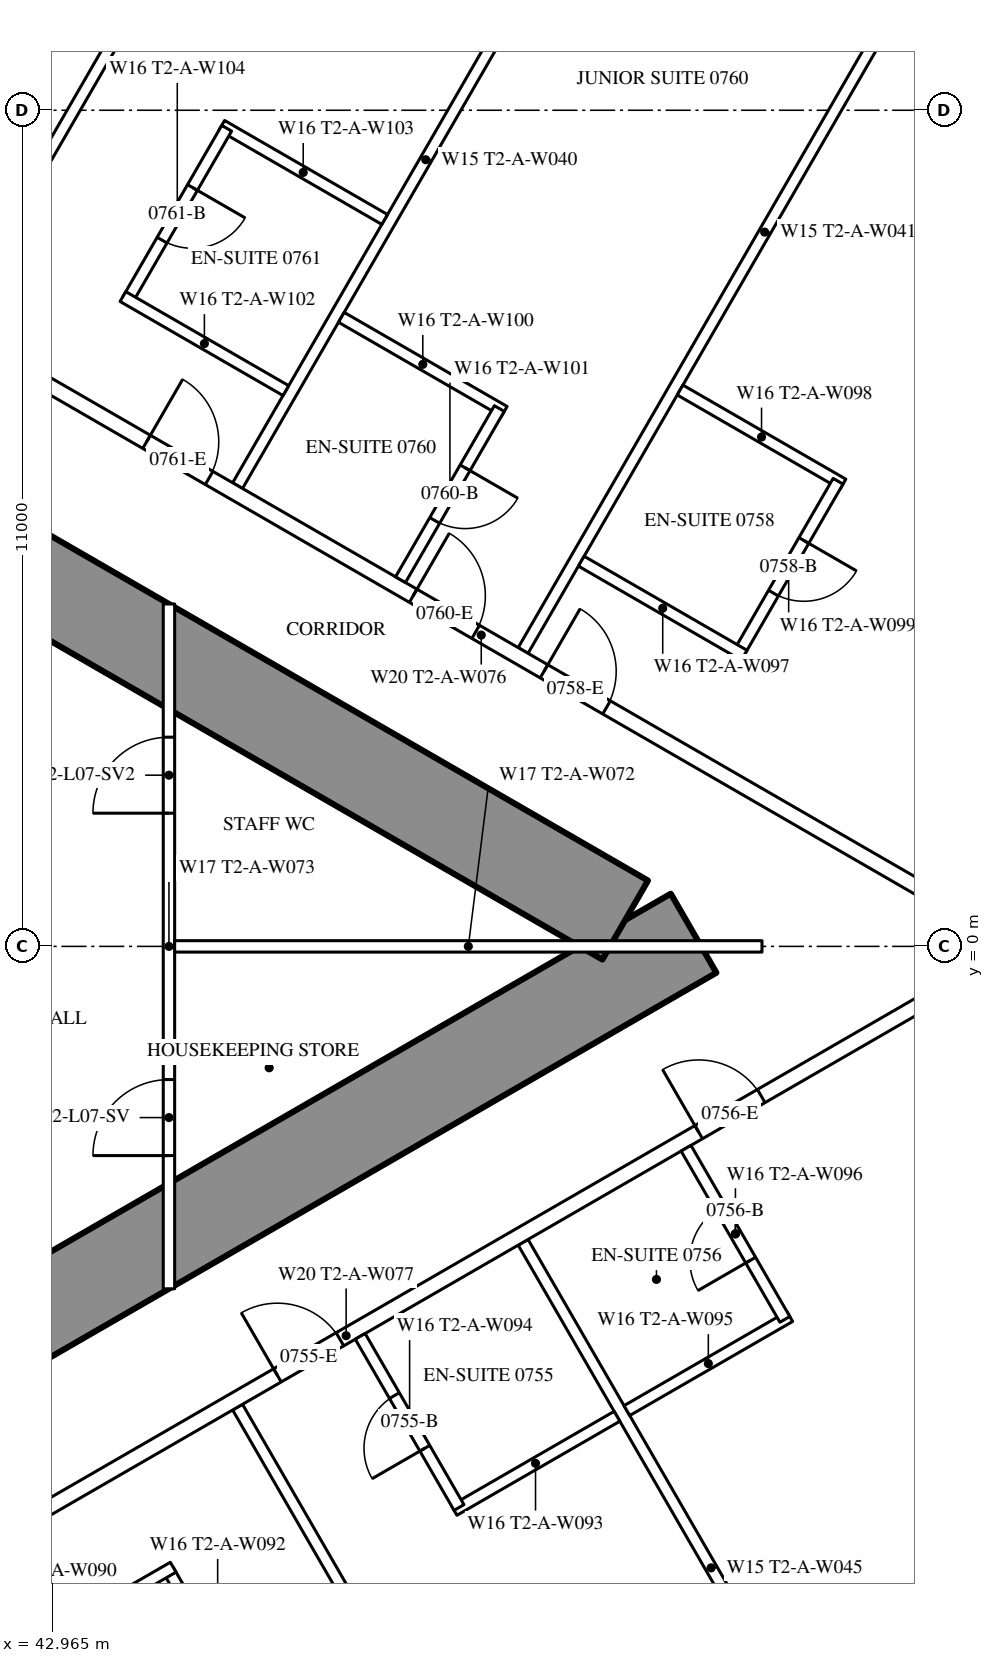
"""IFC4 building model, lengths in metres.
Left out: names, types, materials, properties, quantities, classifications, styles, units other than length and angle.
Written with IfcOpenShell. Run it as: python <this file> out.ifc"""

import sys

from ifc_helpers import new_model, si_unit, direction, frame, frame_2d, origin, place, context, subcontext, project, spatial, rectangle, extrude, element, fill, save


model = new_model("IFC4")
c1 = context("Model", 3, precision=1e-05, world=origin(), true_north=direction((0.0, 1.0)))
c2 = subcontext(c1, "Body", "Model", "MODEL_VIEW")
j1 = project(units=[si_unit("LENGTHUNIT", "METRE"), si_unit("PLANEANGLEUNIT", "RADIAN")], contexts=[c1])
p1 = place(None, origin())
s1 = spatial("IfcSite", under=j1, at=p1, CompositionType="ELEMENT")
p2 = place(p1, origin())
s2 = spatial("IfcBuilding", under=s1, at=p2, CompositionType="ELEMENT")
p3 = place(p2, frame((0.0, 0.0, 32.0)))
s3 = spatial("IfcBuildingStorey", under=s2, at=p3, CompositionType="ELEMENT", Elevation=32.0)
p4 = place(p3, frame((27.2, -13.8, 0.0), z_axis=(0.0, 0.0, 1.0), x_axis=(0.866027159892, 0.499996958321, 0.0)))
e1 = element("IfcWall", 1, at=p4, inside=s3, PredefinedType="SHEAR", context=c2, shape_type="SweptSolid", body=[
    extrude(rectangle(XDim=27.947, YDim=1.2, at=frame_2d((13.973, 0.0))), origin(), (0.0, 0.0, 1.0), 3.5),
])
p5 = place(p4, frame((4.6, 0.0, 0.0)))
e2 = element("IfcOpeningElement", 2, at=p5, cuts=e1, PredefinedType="OPENING", context=c2, shape_type="SweptSolid", body=[
    extrude(rectangle(XDim=1.0, YDim=2.2, at=frame_2d((0.5, 1.1))), frame((0.0, 0.61, 0.0), z_axis=(0.0, -1.0, 0.0), x_axis=(1.0, 0.0, 0.0)), (0.0, 0.0, 1.0), 1.22),
])
p6 = place(p4, frame((13.395, 0.0, 0.0)))
e3 = element("IfcOpeningElement", 3, at=p6, cuts=e1, PredefinedType="OPENING", context=c2, shape_type="SweptSolid", body=[
    extrude(rectangle(XDim=1.8, YDim=2.2, at=frame_2d((0.9, 1.1))), frame((0.0, 0.61, 0.0), z_axis=(0.0, -1.0, 0.0), x_axis=(1.0, 0.0, 0.0)), (0.0, 0.0, 1.0), 1.22),
])
p7 = place(p3, frame((27.2, 13.8, 0.0), z_axis=(0.0, 0.0, 1.0), x_axis=(0.866024515034, -0.500001539357, 0.0)))
e4 = element("IfcWall", 4, at=p7, inside=s3, PredefinedType="SHEAR", context=c2, shape_type="SweptSolid", body=[
    extrude(rectangle(XDim=26.907, YDim=1.2, at=frame_2d((13.454, 0.0))), origin(), (0.0, 0.0, 1.0), 3.5),
])
p8 = place(p7, frame((4.6, 0.0, 0.0)))
e5 = element("IfcOpeningElement", 5, at=p8, cuts=e4, PredefinedType="OPENING", context=c2, shape_type="SweptSolid", body=[
    extrude(rectangle(XDim=1.0, YDim=2.2, at=frame_2d((0.5, 1.1))), frame((0.0, 0.61, 0.0), z_axis=(0.0, -1.0, 0.0), x_axis=(1.0, 0.0, 0.0)), (0.0, 0.0, 1.0), 1.22),
])
p9 = place(p7, frame((13.395, 0.0, 0.0)))
e6 = element("IfcOpeningElement", 6, at=p9, cuts=e4, PredefinedType="OPENING", context=c2, shape_type="SweptSolid", body=[
    extrude(rectangle(XDim=1.8, YDim=2.2, at=frame_2d((0.9, 1.1))), frame((0.0, 0.61, 0.0), z_axis=(0.0, -1.0, 0.0), x_axis=(1.0, 0.0, 0.0)), (0.0, 0.0, 1.0), 1.22),
])
p10 = place(p3, frame((41.647, -8.23, 0.0), z_axis=(0.0, 0.0, 1.0), x_axis=(0.49998590462, -0.866033541603, 0.0)))
e7 = element("IfcWall", 7, at=p10, inside=s3, PredefinedType="PARTITIONING", context=c2, shape_type="SweptSolid", body=[
    extrude(rectangle(XDim=12.621, YDim=0.15, at=frame_2d((6.311, 0.0))), origin(), (0.0, 0.0, 1.0), 3.25),
])
p11 = place(p3, frame((45.403, -6.062, 0.0), z_axis=(0.0, 0.0, 1.0), x_axis=(0.500007077968, -0.866021317279, 0.0)))
e8 = element("IfcWall", 8, at=p11, inside=s3, PredefinedType="PARTITIONING", context=c2, shape_type="SweptSolid", body=[
    extrude(rectangle(XDim=12.721, YDim=0.15, at=frame_2d((6.361, 0.0))), origin(), (0.0, 0.0, 1.0), 3.25),
])
p12 = place(p3, frame((49.159, -3.893, 0.0), z_axis=(0.0, 0.0, 1.0), x_axis=(0.499998773722, -0.866026111775, 0.0)))
e9 = element("IfcWall", 9, at=p12, inside=s3, PredefinedType="PARTITIONING", context=c2, shape_type="SweptSolid", body=[
    extrude(rectangle(XDim=9.892, YDim=0.15, at=frame_2d((4.946, 0.0))), origin(), (0.0, 0.0, 1.0), 2.25),
])
p13 = place(p3, frame((41.647, 8.23, 0.0), z_axis=(0.0, 0.0, 1.0), x_axis=(0.49998590462, 0.866033541603, 0.0)))
e10 = element("IfcWall", 10, at=p13, inside=s3, PredefinedType="PARTITIONING", context=c2, shape_type="SweptSolid", body=[
    extrude(rectangle(XDim=12.621, YDim=0.15, at=frame_2d((6.311, 0.0))), origin(), (0.0, 0.0, 1.0), 3.25),
])
p14 = place(p3, frame((45.403, 6.062, 0.0), z_axis=(0.0, 0.0, 1.0), x_axis=(0.500013434677, 0.866017647131, 0.0)))
e11 = element("IfcWall", 11, at=p14, inside=s3, PredefinedType="PARTITIONING", context=c2, shape_type="SweptSolid", body=[
    extrude(rectangle(XDim=9.902, YDim=0.15, at=frame_2d((4.951, 0.0))), origin(), (0.0, 0.0, 1.0), 2.25),
])
p15 = place(p3, frame((49.159, 3.893, 0.0), z_axis=(0.0, 0.0, 1.0), x_axis=(0.499995664361, 0.866027906952, 0.0)))
e12 = element("IfcWall", 12, at=p15, inside=s3, PredefinedType="PARTITIONING", context=c2, shape_type="SweptSolid", body=[
    extrude(rectangle(XDim=12.711, YDim=0.15, at=frame_2d((6.356, 0.0))), origin(), (0.0, 0.0, 1.0), 3.25),
])
p16 = place(p3, frame((37.96, -10.243, 0.0), z_axis=(0.0, 0.0, 1.0), x_axis=(0.866026429433, 0.499998223521, 0.0)))
e13 = element("IfcWall", 13, at=p16, inside=s3, PredefinedType="PARTITIONING", context=c2, shape_type="SweptSolid", body=[
    extrude(rectangle(XDim=20.487, YDim=0.2, at=frame_2d((10.243, 0.0))), origin(), (0.0, 0.0, 1.0), 3.25),
])
p17 = place(p16, frame((4.575, 0.0, 0.0)))
e14 = element("IfcOpeningElement", 14, at=p17, cuts=e13, PredefinedType="OPENING", context=c2, shape_type="SweptSolid", body=[
    extrude(rectangle(XDim=0.95, YDim=2.2, at=frame_2d((0.475, 1.1))), frame((0.0, 0.11, 0.0), z_axis=(0.0, -1.0, 0.0), x_axis=(1.0, 0.0, 0.0)), (0.0, 0.0, 1.0), 0.22),
])
p18 = place(p16, frame((9.199, 0.0, 0.0)))
e15 = element("IfcOpeningElement", 15, at=p18, cuts=e13, PredefinedType="OPENING", context=c2, shape_type="SweptSolid", body=[
    extrude(rectangle(XDim=0.95, YDim=2.2, at=frame_2d((0.475, 1.1))), frame((0.0, 0.11, 0.0), z_axis=(0.0, -1.0, 0.0), x_axis=(1.0, 0.0, 0.0)), (0.0, 0.0, 1.0), 0.22),
])
p19 = place(p16, frame((15.599, 0.0, 0.0)))
e16 = element("IfcOpeningElement", 16, at=p19, cuts=e13, PredefinedType="OPENING", context=c2, shape_type="SweptSolid", body=[
    extrude(rectangle(XDim=0.95, YDim=2.2, at=frame_2d((0.475, 1.1))), frame((0.0, 0.11, 0.0), z_axis=(0.0, -1.0, 0.0), x_axis=(1.0, 0.0, 0.0)), (0.0, 0.0, 1.0), 0.22),
])
p20 = place(p16, frame((2.875, 0.0, 0.0)))
e17 = element("IfcOpeningElement", 17, at=p20, cuts=e13, PredefinedType="OPENING", context=c2, shape_type="SweptSolid", body=[
    extrude(rectangle(XDim=0.95, YDim=2.2, at=frame_2d((0.475, 1.1))), frame((0.0, 0.11, 0.0), z_axis=(0.0, -1.0, 0.0), x_axis=(1.0, 0.0, 0.0)), (0.0, 0.0, 1.0), 0.22),
])
p21 = place(p3, frame((41.619, 8.131, 0.0), z_axis=(0.0, 0.0, 1.0), x_axis=(0.86603245327, -0.499987789734, 0.0)))
e18 = element("IfcWall", 18, at=p21, inside=s3, PredefinedType="PARTITIONING", context=c2, shape_type="SweptSolid", body=[
    extrude(rectangle(XDim=16.142, YDim=0.2, at=frame_2d((8.071, 0.0))), origin(), (0.0, 0.0, 1.0), 3.25),
])
p22 = place(p21, frame((9.024, 0.0, 0.0)))
e19 = element("IfcOpeningElement", 19, at=p22, cuts=e18, PredefinedType="OPENING", context=c2, shape_type="SweptSolid", body=[
    extrude(rectangle(XDim=0.95, YDim=2.2, at=frame_2d((0.475, 1.1))), frame((0.0, 0.11, 0.0), z_axis=(0.0, -1.0, 0.0), x_axis=(1.0, 0.0, 0.0)), (0.0, 0.0, 1.0), 0.22),
])
p23 = place(p21, frame((7.037, 0.0, 0.0)))
e20 = element("IfcOpeningElement", 20, at=p23, cuts=e18, PredefinedType="OPENING", context=c2, shape_type="SweptSolid", body=[
    extrude(rectangle(XDim=0.95, YDim=2.2, at=frame_2d((0.475, 1.1))), frame((0.0, 0.11, 0.0), z_axis=(0.0, -1.0, 0.0), x_axis=(1.0, 0.0, 0.0)), (0.0, 0.0, 1.0), 0.22),
])
p24 = place(p21, frame((2.987, 0.0, 0.0)))
e21 = element("IfcOpeningElement", 21, at=p24, cuts=e18, PredefinedType="OPENING", context=c2, shape_type="SweptSolid", body=[
    extrude(rectangle(XDim=0.95, YDim=2.2, at=frame_2d((0.475, 1.1))), frame((0.0, 0.11, 0.0), z_axis=(0.0, -1.0, 0.0), x_axis=(1.0, 0.0, 0.0)), (0.0, 0.0, 1.0), 0.22),
])
p25 = place(p3, frame((44.491, -8.205, 0.0), z_axis=(0.0, 0.0, 1.0), x_axis=(0.500047596559, -0.865997922154, 0.0)))
e22 = element("IfcWall", 22, at=p25, inside=s3, PredefinedType="PARTITIONING", context=c2, shape_type="SweptSolid", body=[
    extrude(rectangle(XDim=2.6, YDim=0.15, at=frame_2d((1.3, 0.0))), origin(), (0.0, 0.0, 1.0), 3.25),
])
p26 = place(p25, frame((0.9, 0.0, 0.0)))
e23 = element("IfcOpeningElement", 23, at=p26, cuts=e22, PredefinedType="OPENING", context=c2, shape_type="SweptSolid", body=[
    extrude(rectangle(XDim=0.8, YDim=2.2, at=frame_2d((0.4, 1.1))), frame((0.0, 0.085, 0.0), z_axis=(0.0, -1.0, 0.0), x_axis=(1.0, 0.0, 0.0)), (0.0, 0.0, 1.0), 0.17),
])
for number, where, z_axis, x_axis in (
    (24, (42.412, -9.405, 0.0), (0.0, 0.0, 1.0), (0.866, 0.5, 0.0)),
    (25, (48.251, -7.42, 0.0), (0.0, 0.0, 1.0), (0.866, 0.5, 0.0)),
):
    element("IfcWall", number, at=place(p3, frame(where, z_axis=z_axis, x_axis=x_axis)), inside=s3, PredefinedType="PARTITIONING", context=c2, shape_type="SweptSolid", body=[
        extrude(rectangle(XDim=2.475, YDim=0.15, at=frame_2d((1.237, 0.0))), origin(), (0.0, 0.0, 1.0), 3.25),
    ])
p27 = place(p3, frame((47.016, -5.13, 0.0), z_axis=(0.0, 0.0, 1.0), x_axis=(0.500006934395, -0.866021400173, 0.0)))
e26 = element("IfcWall", 26, at=p27, inside=s3, PredefinedType="PARTITIONING", context=c2, shape_type="SweptSolid", body=[
    extrude(rectangle(XDim=2.6, YDim=0.15, at=frame_2d((1.3, 0.0))), origin(), (0.0, 0.0, 1.0), 3.25),
])
p28 = place(p27, frame((0.9, 0.0, 0.0)))
e27 = element("IfcOpeningElement", 27, at=p28, cuts=e26, PredefinedType="OPENING", context=c2, shape_type="SweptSolid", body=[
    extrude(rectangle(XDim=0.8, YDim=2.2, at=frame_2d((0.4, 1.1))), frame((0.0, 0.085, 0.0), z_axis=(0.0, -1.0, 0.0), x_axis=(1.0, 0.0, 0.0)), (0.0, 0.0, 1.0), 0.17),
])
p29 = place(p3, frame((50.524, -6.107, 0.0), z_axis=(0.0, 0.0, 1.0), x_axis=(0.866031185235, 0.4999899861, 0.0)))
e28 = element("IfcWall", 28, at=p29, inside=s3, PredefinedType="PARTITIONING", context=c2, shape_type="SweptSolid", body=[
    extrude(rectangle(XDim=2.475, YDim=0.15, at=frame_2d((1.238, 0.0))), origin(), (0.0, 0.0, 1.0), 3.25),
])
p30 = place(p3, frame((51.303, -2.656, 0.0), z_axis=(0.0, 0.0, 1.0), x_axis=(0.500047596559, -0.865997922154, 0.0)))
e29 = element("IfcWall", 29, at=p30, inside=s3, PredefinedType="PARTITIONING", context=c2, shape_type="SweptSolid", body=[
    extrude(rectangle(XDim=2.6, YDim=0.15, at=frame_2d((1.3, 0.0))), origin(), (0.0, 0.0, 1.0), 3.25),
])
p31 = place(p30, frame((0.9, 0.0, 0.0)))
e30 = element("IfcOpeningElement", 30, at=p31, cuts=e29, PredefinedType="OPENING", context=c2, shape_type="SweptSolid", body=[
    extrude(rectangle(XDim=0.8, YDim=2.2, at=frame_2d((0.4, 1.1))), frame((0.0, 0.085, 0.0), z_axis=(0.0, -1.0, 0.0), x_axis=(1.0, 0.0, 0.0)), (0.0, 0.0, 1.0), 0.17),
])
p32 = place(p3, frame((51.224, 7.32, 0.0), z_axis=(0.0, 0.0, 1.0), x_axis=(0.866031185235, -0.4999899861, 0.0)))
e31 = element("IfcWall", 31, at=p32, inside=s3, PredefinedType="PARTITIONING", context=c2, shape_type="SweptSolid", body=[
    extrude(rectangle(XDim=2.475, YDim=0.15, at=frame_2d((1.238, 0.0))), origin(), (0.0, 0.0, 1.0), 3.25),
])
p33 = place(p3, frame((52.003, 3.868, 0.0), z_axis=(0.0, 0.0, 1.0), x_axis=(0.500047596559, 0.865997922154, 0.0)))
e32 = element("IfcWall", 32, at=p33, inside=s3, PredefinedType="PARTITIONING", context=c2, shape_type="SweptSolid", body=[
    extrude(rectangle(XDim=2.6, YDim=0.15, at=frame_2d((1.3, 0.0))), origin(), (0.0, 0.0, 1.0), 3.25),
])
p34 = place(p33, frame((0.9, 0.0, 0.0)))
e33 = element("IfcOpeningElement", 33, at=p34, cuts=e32, PredefinedType="OPENING", context=c2, shape_type="SweptSolid", body=[
    extrude(rectangle(XDim=0.8, YDim=2.2, at=frame_2d((0.4, 1.1))), frame((0.0, 0.085, 0.0), z_axis=(0.0, -1.0, 0.0), x_axis=(1.0, 0.0, 0.0)), (0.0, 0.0, 1.0), 0.17),
])
p35 = place(p3, frame((49.925, 5.068, 0.0), z_axis=(0.0, 0.0, 1.0), x_axis=(0.866006523861, -0.500032699561, 0.0)))
e34 = element("IfcWall", 34, at=p35, inside=s3, PredefinedType="PARTITIONING", context=c2, shape_type="SweptSolid", body=[
    extrude(rectangle(XDim=2.475, YDim=0.15, at=frame_2d((1.237, 0.0))), origin(), (0.0, 0.0, 1.0), 3.25),
])
p36 = place(p3, frame((46.768, 8.276, 0.0), z_axis=(0.0, 0.0, 1.0), x_axis=(0.866031185235, -0.4999899861, 0.0)))
e35 = element("IfcWall", 35, at=p36, inside=s3, PredefinedType="PARTITIONING", context=c2, shape_type="SweptSolid", body=[
    extrude(rectangle(XDim=2.475, YDim=0.15, at=frame_2d((1.238, 0.0))), origin(), (0.0, 0.0, 1.0), 3.25),
])
p37 = place(p3, frame((47.546, 4.824, 0.0), z_axis=(0.0, 0.0, 1.0), x_axis=(0.500006934395, 0.866021400173, 0.0)))
e36 = element("IfcWall", 36, at=p37, inside=s3, PredefinedType="PARTITIONING", context=c2, shape_type="SweptSolid", body=[
    extrude(rectangle(XDim=2.6, YDim=0.15, at=frame_2d((1.3, 0.0))), origin(), (0.0, 0.0, 1.0), 3.25),
])
p38 = place(p37, frame((0.9, 0.0, 0.0)))
e37 = element("IfcOpeningElement", 37, at=p38, cuts=e36, PredefinedType="OPENING", context=c2, shape_type="SweptSolid", body=[
    extrude(rectangle(XDim=0.8, YDim=2.2, at=frame_2d((0.4, 1.1))), frame((0.0, 0.085, 0.0), z_axis=(0.0, -1.0, 0.0), x_axis=(1.0, 0.0, 0.0)), (0.0, 0.0, 1.0), 0.17),
])
p39 = place(p3, frame((45.195, 10.801, 0.0), z_axis=(0.0, 0.0, 1.0), x_axis=(0.86604923931, -0.499958713387, 0.0)))
e38 = element("IfcWall", 38, at=p39, inside=s3, PredefinedType="PARTITIONING", context=c2, shape_type="SweptSolid", body=[
    extrude(rectangle(XDim=2.475, YDim=0.15, at=frame_2d((1.237, 0.0))), origin(), (0.0, 0.0, 1.0), 3.25),
])
p40 = place(p3, frame((43.959, 8.512, 0.0), z_axis=(0.0, 0.0, 1.0), x_axis=(0.500006934395, 0.866021400173, 0.0)))
e39 = element("IfcWall", 39, at=p40, inside=s3, PredefinedType="PARTITIONING", context=c2, shape_type="SweptSolid", body=[
    extrude(rectangle(XDim=2.6, YDim=0.15, at=frame_2d((1.3, 0.0))), origin(), (0.0, 0.0, 1.0), 3.25),
])
p41 = place(p40, frame((0.9, 0.0, 0.0)))
e40 = element("IfcOpeningElement", 40, at=p41, cuts=e39, PredefinedType="OPENING", context=c2, shape_type="SweptSolid", body=[
    extrude(rectangle(XDim=0.8, YDim=2.2, at=frame_2d((0.4, 1.1))), frame((0.0, 0.085, 0.0), z_axis=(0.0, -1.0, 0.0), x_axis=(1.0, 0.0, 0.0)), (0.0, 0.0, 1.0), 0.17),
])
p42 = place(p3, frame((43.895, 8.549, 0.0), z_axis=(0.0, 0.0, 1.0), x_axis=(0.866031185235, -0.4999899861, 0.0)))
e41 = element("IfcWall", 41, at=p42, inside=s3, PredefinedType="PARTITIONING", context=c2, shape_type="SweptSolid", body=[
    extrude(rectangle(XDim=2.475, YDim=0.15, at=frame_2d((1.238, 0.0))), origin(), (0.0, 0.0, 1.0), 3.25),
])
p43 = place(p3, frame((44.5, -4.505, 0.0), z_axis=(0.0, 0.0, 1.0), x_axis=(0.0, 1.0, 0.0)))
e42 = element("IfcWall", 42, at=p43, inside=s3, PredefinedType="PARTITIONING", context=c2, shape_type="SweptSolid", body=[
    extrude(rectangle(XDim=9.009, YDim=0.15, at=frame_2d((4.505, 0.0))), origin(), (0.0, 0.0, 1.0), 2.45),
])
p44 = place(p43, frame((1.752, 0.0, 0.0)))
e43 = element("IfcOpeningElement", 43, at=p44, cuts=e42, PredefinedType="OPENING", context=c2, shape_type="SweptSolid", body=[
    extrude(rectangle(XDim=1.0, YDim=2.2, at=frame_2d((0.5, 1.1))), frame((0.0, 0.085, 0.0), z_axis=(0.0, -1.0, 0.0), x_axis=(1.0, 0.0, 0.0)), (0.0, 0.0, 1.0), 0.17),
])
p45 = place(p43, frame((6.257, 0.0, 0.0)))
e44 = element("IfcOpeningElement", 44, at=p45, cuts=e42, PredefinedType="OPENING", context=c2, shape_type="SweptSolid", body=[
    extrude(rectangle(XDim=1.0, YDim=2.2, at=frame_2d((0.5, 1.1))), frame((0.0, 0.085, 0.0), z_axis=(0.0, -1.0, 0.0), x_axis=(1.0, 0.0, 0.0)), (0.0, 0.0, 1.0), 0.17),
])
p46 = place(p3, frame((44.575, 0.0, 0.0), z_axis=(0.0, 0.0, 1.0), x_axis=(1.0, 0.0, 0.0)))
e45 = element("IfcWall", 45, at=p46, inside=s3, PredefinedType="PARTITIONING", context=c2, shape_type="SweptSolid", body=[
    extrude(rectangle(XDim=7.727, YDim=0.15, at=frame_2d((3.864, 0.0))), origin(), (0.0, 0.0, 1.0), 2.25),
])
p47 = place(p28, origin())
e46 = element("IfcDoor", 46, at=p47, inside=s3, OperationType="SINGLE_SWING_RIGHT", PredefinedType="DOOR", context=c2, shape_type="SweptSolid", body=[
    extrude(rectangle(XDim=0.8, YDim=2.2, at=frame_2d((0.4, 1.1))), frame((0.0, 0.025, 0.0), z_axis=(0.0, -1.0, 0.0), x_axis=(1.0, 0.0, 0.0)), (0.0, 0.0, 1.0), 0.05),
])
fill(e27, e46)
p48 = place(p18, origin())
e47 = element("IfcDoor", 47, at=p48, inside=s3, OperationType="SINGLE_SWING_LEFT", PredefinedType="DOOR", context=c2, shape_type="SweptSolid", body=[
    extrude(rectangle(XDim=0.95, YDim=2.2, at=frame_2d((0.475, 1.1))), frame((0.0, 0.025, 0.0), z_axis=(0.0, -1.0, 0.0), x_axis=(1.0, 0.0, 0.0)), (0.0, 0.0, 1.0), 0.05),
])
fill(e15, e47)
p49 = place(p31, origin())
e48 = element("IfcDoor", 48, at=p49, inside=s3, OperationType="SINGLE_SWING_RIGHT", PredefinedType="DOOR", context=c2, shape_type="SweptSolid", body=[
    extrude(rectangle(XDim=0.8, YDim=2.2, at=frame_2d((0.4, 1.1))), frame((0.0, 0.025, 0.0), z_axis=(0.0, -1.0, 0.0), x_axis=(1.0, 0.0, 0.0)), (0.0, 0.0, 1.0), 0.05),
])
fill(e30, e48)
p50 = place(p19, origin())
e49 = element("IfcDoor", 49, at=p50, inside=s3, OperationType="SINGLE_SWING_LEFT", PredefinedType="DOOR", context=c2, shape_type="SweptSolid", body=[
    extrude(rectangle(XDim=0.95, YDim=2.2, at=frame_2d((0.475, 1.1))), frame((0.0, 0.025, 0.0), z_axis=(0.0, -1.0, 0.0), x_axis=(1.0, 0.0, 0.0)), (0.0, 0.0, 1.0), 0.05),
])
fill(e16, e49)
p51 = place(p34, origin())
e50 = element("IfcDoor", 50, at=p51, inside=s3, OperationType="SINGLE_SWING_RIGHT", PredefinedType="DOOR", context=c2, shape_type="SweptSolid", body=[
    extrude(rectangle(XDim=0.8, YDim=2.2, at=frame_2d((0.4, 1.1))), frame((0.0, 0.025, 0.0), z_axis=(0.0, -1.0, 0.0), x_axis=(1.0, 0.0, 0.0)), (0.0, 0.0, 1.0), 0.05),
])
fill(e33, e50)
p52 = place(p22, origin())
e51 = element("IfcDoor", 51, at=p52, inside=s3, OperationType="SINGLE_SWING_LEFT", PredefinedType="DOOR", context=c2, shape_type="SweptSolid", body=[
    extrude(rectangle(XDim=0.95, YDim=2.2, at=frame_2d((0.475, 1.1))), frame((0.0, 0.025, 0.0), z_axis=(0.0, -1.0, 0.0), x_axis=(1.0, 0.0, 0.0)), (0.0, 0.0, 1.0), 0.05),
])
fill(e19, e51)
p53 = place(p38, origin())
e52 = element("IfcDoor", 52, at=p53, inside=s3, OperationType="SINGLE_SWING_RIGHT", PredefinedType="DOOR", context=c2, shape_type="SweptSolid", body=[
    extrude(rectangle(XDim=0.8, YDim=2.2, at=frame_2d((0.4, 1.1))), frame((0.0, 0.025, 0.0), z_axis=(0.0, -1.0, 0.0), x_axis=(1.0, 0.0, 0.0)), (0.0, 0.0, 1.0), 0.05),
])
fill(e37, e52)
p54 = place(p23, origin())
e53 = element("IfcDoor", 53, at=p54, inside=s3, OperationType="SINGLE_SWING_LEFT", PredefinedType="DOOR", context=c2, shape_type="SweptSolid", body=[
    extrude(rectangle(XDim=0.95, YDim=2.2, at=frame_2d((0.475, 1.1))), frame((0.0, 0.025, 0.0), z_axis=(0.0, -1.0, 0.0), x_axis=(1.0, 0.0, 0.0)), (0.0, 0.0, 1.0), 0.05),
])
fill(e20, e53)
p55 = place(p41, origin())
e54 = element("IfcDoor", 54, at=p55, inside=s3, OperationType="SINGLE_SWING_RIGHT", PredefinedType="DOOR", context=c2, shape_type="SweptSolid", body=[
    extrude(rectangle(XDim=0.8, YDim=2.2, at=frame_2d((0.4, 1.1))), frame((0.0, 0.025, 0.0), z_axis=(0.0, -1.0, 0.0), x_axis=(1.0, 0.0, 0.0)), (0.0, 0.0, 1.0), 0.05),
])
fill(e40, e54)
p56 = place(p24, origin())
e55 = element("IfcDoor", 55, at=p56, inside=s3, OperationType="SINGLE_SWING_LEFT", PredefinedType="DOOR", context=c2, shape_type="SweptSolid", body=[
    extrude(rectangle(XDim=0.95, YDim=2.2, at=frame_2d((0.475, 1.1))), frame((0.0, 0.025, 0.0), z_axis=(0.0, -1.0, 0.0), x_axis=(1.0, 0.0, 0.0)), (0.0, 0.0, 1.0), 0.05),
])
fill(e21, e55)
p57 = place(p44, origin())
e56 = element("IfcDoor", 56, at=p57, inside=s3, OperationType="SINGLE_SWING_LEFT", PredefinedType="DOOR", context=c2, shape_type="SweptSolid", body=[
    extrude(rectangle(XDim=1.0, YDim=2.2, at=frame_2d((0.5, 1.1))), frame((0.0, 0.025, 0.0), z_axis=(0.0, -1.0, 0.0), x_axis=(1.0, 0.0, 0.0)), (0.0, 0.0, 1.0), 0.05),
])
fill(e43, e56)
p58 = place(p45, origin())
e57 = element("IfcDoor", 57, at=p58, inside=s3, OperationType="SINGLE_SWING_LEFT", PredefinedType="DOOR", context=c2, shape_type="SweptSolid", body=[
    extrude(rectangle(XDim=1.0, YDim=2.2, at=frame_2d((0.5, 1.1))), frame((0.0, 0.025, 0.0), z_axis=(0.0, -1.0, 0.0), x_axis=(1.0, 0.0, 0.0)), (0.0, 0.0, 1.0), 0.05),
])
fill(e44, e57)
save(model, sys.argv[1])
